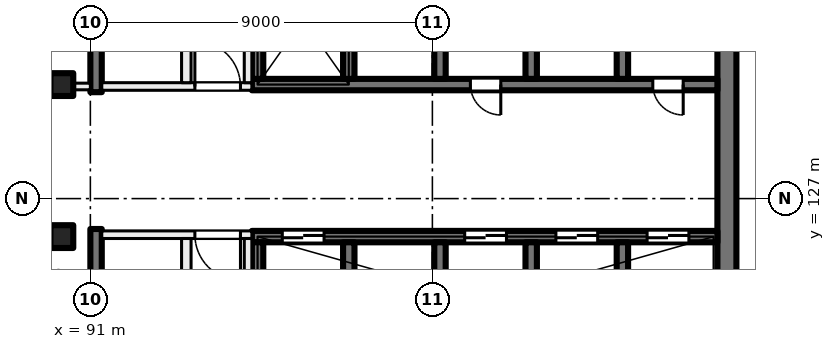
"""IFC4 building model, lengths in metres.
Left out: names, types, materials, properties, quantities, classifications, styles, units other than length and angle.
Written with IfcOpenShell. Run it as: python <this file> out.ifc"""

import sys

from ifc_helpers import new_model, si_unit, direction, frame, frame_2d, origin, origin_2d, place, context, subcontext, project, spatial, rectangle, extrude, element, fill, save


model = new_model("IFC4")
c1 = context("Model", 3, precision=1e-05, world=origin(), true_north=direction((0.0, 1.0)))
c2 = subcontext(c1, "Body", "Model", "MODEL_VIEW")
j1 = project(units=[si_unit("LENGTHUNIT", "METRE"), si_unit("PLANEANGLEUNIT", "RADIAN")], contexts=[c1])
p1 = place(None, origin())
s1 = spatial("IfcSite", under=j1, at=p1, CompositionType="ELEMENT")
p2 = place(p1, origin())
s2 = spatial("IfcBuilding", under=s1, at=p2, CompositionType="ELEMENT")
p3 = place(p2, frame((0.0, 0.0, 228.0)))
s3 = spatial("IfcBuildingStorey", under=s2, at=p3, CompositionType="ELEMENT", Elevation=228.0)
for number, where, z_axis, x_axis in (
    (1, (90.25, 130.0, 0.0), (0.0, 0.0, 1.0), (1.0, 0.0, 0.0)),
    (2, (90.25, 126.0, 0.0), (0.0, 0.0, 1.0), (1.0, 0.0, 0.0)),
):
    element("IfcColumn", number, at=place(p3, frame(where, z_axis=z_axis, x_axis=x_axis)), inside=s3, PredefinedType="COLUMN", context=c2, shape_type="SweptSolid", body=[
        extrude(rectangle(XDim=0.6, YDim=0.6, at=origin_2d()), origin(), (0.0, 0.0, 1.0), 4.0),
    ])
p4 = place(p3, frame((107.75, 135.2, 0.0), z_axis=(0.0, 0.0, 1.0), x_axis=(0.0, -1.0, 0.0)))
e3 = element("IfcWall", 3, at=p4, inside=s3, PredefinedType="SHEAR", context=c2, shape_type="SweptSolid", body=[
    extrude(rectangle(XDim=14.4, YDim=0.5, at=frame_2d((7.2, 0.0))), origin(), (0.0, 0.0, 1.0), 4.0),
])
p5 = place(p3, frame((107.5, 130.0, 0.0), z_axis=(0.0, 0.0, 1.0), x_axis=(-1.0, 0.0, 0.0)))
e4 = element("IfcWall", 4, at=p5, inside=s3, PredefinedType="SHEAR", context=c2, shape_type="SweptSolid", body=[
    extrude(rectangle(XDim=12.25, YDim=0.3, at=frame_2d((6.125, 0.0))), origin(), (0.0, 0.0, 1.0), 4.0),
])
p6 = place(p5, frame((0.9, 0.0, 0.0)))
e5 = element("IfcOpeningElement", 5, at=p6, cuts=e4, PredefinedType="OPENING", context=c2, shape_type="SweptSolid", body=[
    extrude(rectangle(XDim=0.8, YDim=2.1, at=frame_2d((0.4, 1.05))), frame((0.0, 0.16, 0.0), z_axis=(0.0, -1.0, 0.0), x_axis=(1.0, 0.0, 0.0)), (0.0, 0.0, 1.0), 0.32),
])
p7 = place(p5, frame((5.7, 0.0, 0.0)))
e6 = element("IfcOpeningElement", 6, at=p7, cuts=e4, PredefinedType="OPENING", context=c2, shape_type="SweptSolid", body=[
    extrude(rectangle(XDim=0.8, YDim=2.1, at=frame_2d((0.4, 1.05))), frame((0.0, 0.16, 0.0), z_axis=(0.0, -1.0, 0.0), x_axis=(1.0, 0.0, 0.0)), (0.0, 0.0, 1.0), 0.32),
])
for number, where, z_axis, x_axis in (
    (7, (105.0, 133.25, 0.0), (0.0, 0.0, 1.0), (0.0, -1.0, 0.0)),
    (8, (102.6, 133.25, 0.0), (0.0, 0.0, 1.0), (0.0, -1.0, 0.0)),
    (9, (100.2, 133.25, 0.0), (0.0, 0.0, 1.0), (0.0, -1.0, 0.0)),
    (10, (97.8, 133.25, 0.0), (0.0, 0.0, 1.0), (0.0, -1.0, 0.0)),
    (11, (95.4, 133.25, 0.0), (0.0, 0.0, 1.0), (0.0, -1.0, 0.0)),
):
    element("IfcWall", number, at=place(p3, frame(where, z_axis=z_axis, x_axis=x_axis)), inside=s3, PredefinedType="SHEAR", context=c2, shape_type="SweptSolid", body=[
        extrude(rectangle(XDim=3.1, YDim=0.3, at=frame_2d((1.55, 0.0))), origin(), (0.0, 0.0, 1.0), 4.0),
    ])
p8 = place(p3, frame((107.5, 126.0, 0.0), z_axis=(0.0, 0.0, 1.0), x_axis=(-1.0, 0.0, 0.0)))
e12 = element("IfcWall", 12, at=p8, inside=s3, PredefinedType="SHEAR", context=c2, shape_type="SweptSolid", body=[
    extrude(rectangle(XDim=12.25, YDim=0.3, at=frame_2d((6.125, 0.0))), origin(), (0.0, 0.0, 1.0), 4.0),
])
p9 = place(p8, frame((0.75, 0.0, 0.0)))
e13 = element("IfcOpeningElement", 13, at=p9, cuts=e12, PredefinedType="OPENING", context=c2, shape_type="SweptSolid", body=[
    extrude(rectangle(XDim=1.1, YDim=2.1, at=frame_2d((0.55, 1.05))), frame((0.0, 0.16, 0.0), z_axis=(0.0, -1.0, 0.0), x_axis=(1.0, 0.0, 0.0)), (0.0, 0.0, 1.0), 0.32),
])
p10 = place(p8, frame((3.15, 0.0, 0.0)))
e14 = element("IfcOpeningElement", 14, at=p10, cuts=e12, PredefinedType="OPENING", context=c2, shape_type="SweptSolid", body=[
    extrude(rectangle(XDim=1.1, YDim=2.1, at=frame_2d((0.55, 1.05))), frame((0.0, 0.16, 0.0), z_axis=(0.0, -1.0, 0.0), x_axis=(1.0, 0.0, 0.0)), (0.0, 0.0, 1.0), 0.32),
])
p11 = place(p8, frame((5.55, 0.0, 0.0)))
e15 = element("IfcOpeningElement", 15, at=p11, cuts=e12, PredefinedType="OPENING", context=c2, shape_type="SweptSolid", body=[
    extrude(rectangle(XDim=1.1, YDim=2.1, at=frame_2d((0.55, 1.05))), frame((0.0, 0.16, 0.0), z_axis=(0.0, -1.0, 0.0), x_axis=(1.0, 0.0, 0.0)), (0.0, 0.0, 1.0), 0.32),
])
p12 = place(p8, frame((10.35, 0.0, 0.0)))
e16 = element("IfcOpeningElement", 16, at=p12, cuts=e12, PredefinedType="OPENING", context=c2, shape_type="SweptSolid", body=[
    extrude(rectangle(XDim=1.1, YDim=2.1, at=frame_2d((0.55, 1.05))), frame((0.0, 0.16, 0.0), z_axis=(0.0, -1.0, 0.0), x_axis=(1.0, 0.0, 0.0)), (0.0, 0.0, 1.0), 0.32),
])
for number, where, z_axis, x_axis in (
    (17, (105.0, 125.85, 0.0), (0.0, 0.0, 1.0), (0.0, -1.0, 0.0)),
    (18, (102.6, 125.85, 0.0), (0.0, 0.0, 1.0), (0.0, -1.0, 0.0)),
    (19, (100.2, 125.85, 0.0), (0.0, 0.0, 1.0), (0.0, -1.0, 0.0)),
    (20, (97.8, 125.85, 0.0), (0.0, 0.0, 1.0), (0.0, -1.0, 0.0)),
    (21, (95.4, 125.85, 0.0), (0.0, 0.0, 1.0), (0.0, -1.0, 0.0)),
):
    element("IfcWall", number, at=place(p3, frame(where, z_axis=z_axis, x_axis=x_axis)), inside=s3, PredefinedType="SHEAR", context=c2, shape_type="SweptSolid", body=[
        extrude(rectangle(XDim=3.1, YDim=0.3, at=frame_2d((1.55, 0.0))), origin(), (0.0, 0.0, 1.0), 4.0),
    ])
for number, where, z_axis, x_axis in (
    (22, (91.15, 138.5, 0.0), (0.0, 0.0, 1.0), (0.0, -1.0, 0.0)),
    (23, (91.15, 126.2, 0.0), (0.0, 0.0, 1.0), (0.0, -1.0, 0.0)),
):
    element("IfcWall", number, at=place(p3, frame(where, z_axis=z_axis, x_axis=x_axis)), inside=s3, PredefinedType="SHEAR", context=c2, shape_type="SweptSolid", body=[
        extrude(rectangle(XDim=8.7, YDim=0.3, at=frame_2d((4.35, 0.0))), origin(), (0.0, 0.0, 1.0), 4.0),
    ])
p13 = place(p3, frame((95.25, 126.05, 0.0), z_axis=(0.0, 0.0, 1.0), x_axis=(-1.0, 0.0, 0.0)))
e24 = element("IfcWall", 24, at=p13, inside=s3, PredefinedType="PARTITIONING", context=c2, shape_type="SweptSolid", body=[
    extrude(rectangle(XDim=3.95, YDim=0.2, at=frame_2d((1.975, 0.0))), origin(), (0.0, 0.0, 1.0), 3.625),
])
p14 = place(p13, frame((0.3, 0.0, 0.0)))
e25 = element("IfcOpeningElement", 25, at=p14, cuts=e24, PredefinedType="OPENING", context=c2, shape_type="SweptSolid", body=[
    extrude(rectangle(XDim=1.2, YDim=2.1, at=frame_2d((0.6, 1.05))), frame((0.0, 0.11, 0.0), z_axis=(0.0, -1.0, 0.0), x_axis=(1.0, 0.0, 0.0)), (0.0, 0.0, 1.0), 0.22),
])
p15 = place(p3, frame((95.15, 117.5, 0.0), z_axis=(0.0, 0.0, 1.0), x_axis=(0.0, 1.0, 0.0)))
e26 = element("IfcWall", 26, at=p15, inside=s3, PredefinedType="PARTITIONING", context=c2, shape_type="SweptSolid", body=[
    extrude(rectangle(XDim=8.45, YDim=0.2, at=frame_2d((4.225, 0.0))), origin(), (0.0, 0.0, 1.0), 3.625),
])
p16 = place(p15, frame((1.725, 0.0, 0.0)))
e27 = element("IfcOpeningElement", 27, at=p16, cuts=e26, PredefinedType="OPENING", context=c2, shape_type="SweptSolid", body=[
    extrude(rectangle(XDim=1.5, YDim=2.1, at=frame_2d((0.75, 1.05))), frame((0.0, 0.11, 0.0), z_axis=(0.0, -1.0, 0.0), x_axis=(1.0, 0.0, 0.0)), (0.0, 0.0, 1.0), 0.22),
])
p17 = place(p3, frame((93.525, 117.5, 0.0), z_axis=(0.0, 0.0, 1.0), x_axis=(0.0, 1.0, 0.0)))
e28 = element("IfcWall", 28, at=p17, inside=s3, PredefinedType="PARTITIONING", context=c2, shape_type="SweptSolid", body=[
    extrude(rectangle(XDim=8.45, YDim=0.25, at=frame_2d((4.225, 0.0))), origin(), (0.0, 0.0, 1.0), 3.625),
])
p18 = place(p17, frame((5.26, 0.0, 0.0)))
e29 = element("IfcOpeningElement", 29, at=p18, cuts=e28, PredefinedType="OPENING", context=c2, shape_type="SweptSolid", body=[
    extrude(rectangle(XDim=0.8, YDim=2.1, at=frame_2d((0.4, 1.05))), frame((0.0, 0.135, 0.0), z_axis=(0.0, -1.0, 0.0), x_axis=(1.0, 0.0, 0.0)), (0.0, 0.0, 1.0), 0.27),
])
p19 = place(p17, frame((0.985, 0.0, 0.0)))
e30 = element("IfcOpeningElement", 30, at=p19, cuts=e28, PredefinedType="OPENING", context=c2, shape_type="SweptSolid", body=[
    extrude(rectangle(XDim=0.8, YDim=2.1, at=frame_2d((0.4, 1.05))), frame((0.0, 0.135, 0.0), z_axis=(0.0, -1.0, 0.0), x_axis=(1.0, 0.0, 0.0)), (0.0, 0.0, 1.0), 0.27),
])
p20 = place(p3, frame((91.3, 129.95, 0.0), z_axis=(0.0, 0.0, 1.0), x_axis=(1.0, 0.0, 0.0)))
e31 = element("IfcWall", 31, at=p20, inside=s3, PredefinedType="PARTITIONING", context=c2, shape_type="SweptSolid", body=[
    extrude(rectangle(XDim=3.95, YDim=0.2, at=frame_2d((1.975, 0.0))), origin(), (0.0, 0.0, 1.0), 3.625),
])
p21 = place(p20, frame((2.45, 0.0, 0.0)))
e32 = element("IfcOpeningElement", 32, at=p21, cuts=e31, PredefinedType="OPENING", context=c2, shape_type="SweptSolid", body=[
    extrude(rectangle(XDim=1.2, YDim=2.1, at=frame_2d((0.6, 1.05))), frame((0.0, 0.11, 0.0), z_axis=(0.0, -1.0, 0.0), x_axis=(1.0, 0.0, 0.0)), (0.0, 0.0, 1.0), 0.22),
])
p22 = place(p3, frame((95.15, 130.05, 0.0), z_axis=(0.0, 0.0, 1.0), x_axis=(0.0, 1.0, 0.0)))
e33 = element("IfcWall", 33, at=p22, inside=s3, PredefinedType="PARTITIONING", context=c2, shape_type="SweptSolid", body=[
    extrude(rectangle(XDim=8.45, YDim=0.2, at=frame_2d((4.225, 0.0))), origin(), (0.0, 0.0, 1.0), 3.625),
])
p23 = place(p22, frame((5.225, 0.0, 0.0)))
e34 = element("IfcOpeningElement", 34, at=p23, cuts=e33, PredefinedType="OPENING", context=c2, shape_type="SweptSolid", body=[
    extrude(rectangle(XDim=1.5, YDim=2.1, at=frame_2d((0.75, 1.05))), frame((0.0, 0.11, 0.0), z_axis=(0.0, -1.0, 0.0), x_axis=(1.0, 0.0, 0.0)), (0.0, 0.0, 1.0), 0.22),
])
p24 = place(p3, frame((93.525, 130.05, 0.0), z_axis=(0.0, 0.0, 1.0), x_axis=(0.0, 1.0, 0.0)))
e35 = element("IfcWall", 35, at=p24, inside=s3, PredefinedType="PARTITIONING", context=c2, shape_type="SweptSolid", body=[
    extrude(rectangle(XDim=8.45, YDim=0.25, at=frame_2d((4.225, 0.0))), origin(), (0.0, 0.0, 1.0), 3.625),
])
p25 = place(p24, frame((1.69, 0.0, 0.0)))
e36 = element("IfcOpeningElement", 36, at=p25, cuts=e35, PredefinedType="OPENING", context=c2, shape_type="SweptSolid", body=[
    extrude(rectangle(XDim=0.8, YDim=2.1, at=frame_2d((0.4, 1.05))), frame((0.0, 0.135, 0.0), z_axis=(0.0, -1.0, 0.0), x_axis=(1.0, 0.0, 0.0)), (0.0, 0.0, 1.0), 0.27),
])
p26 = place(p24, frame((5.965, 0.0, 0.0)))
e37 = element("IfcOpeningElement", 37, at=p26, cuts=e35, PredefinedType="OPENING", context=c2, shape_type="SweptSolid", body=[
    extrude(rectangle(XDim=0.8, YDim=2.1, at=frame_2d((0.4, 1.05))), frame((0.0, 0.135, 0.0), z_axis=(0.0, -1.0, 0.0), x_axis=(1.0, 0.0, 0.0)), (0.0, 0.0, 1.0), 0.27),
])
p27 = place(p3, frame((85.838, 129.95, 0.0), z_axis=(0.0, 0.0, 1.0), x_axis=(1.0, 0.0, 0.0)))
e38 = element("IfcWall", 38, at=p27, inside=s3, PredefinedType="PARTITIONING", context=c2, shape_type="SweptSolid", body=[
    extrude(rectangle(XDim=5.162, YDim=0.175, at=frame_2d((2.581, 0.0))), origin(), (0.0, 0.0, 1.0), 3.625),
])
p28 = place(p27, frame((1.971, 0.0, 0.0)))
e39 = element("IfcOpeningElement", 39, at=p28, cuts=e38, PredefinedType="OPENING", context=c2, shape_type="SweptSolid", body=[
    extrude(rectangle(XDim=1.2, YDim=2.1, at=frame_2d((0.6, 1.05))), frame((0.0, 0.097, 0.0), z_axis=(0.0, -1.0, 0.0), x_axis=(1.0, 0.0, 0.0)), (0.0, 0.0, 1.0), 0.195),
])
p29 = place(p9, origin())
e40 = element("IfcDoor", 40, at=p29, inside=s3, OperationType="DOUBLE_DOOR_SLIDING", PredefinedType="DOOR", context=c2, shape_type="SweptSolid", body=[
    extrude(rectangle(XDim=1.1, YDim=2.1, at=frame_2d((0.55, 1.05))), frame((0.0, 0.025, 0.0), z_axis=(0.0, -1.0, 0.0), x_axis=(1.0, 0.0, 0.0)), (0.0, 0.0, 1.0), 0.05),
])
fill(e13, e40)
p30 = place(p10, origin())
e41 = element("IfcDoor", 41, at=p30, inside=s3, OperationType="DOUBLE_DOOR_SLIDING", PredefinedType="DOOR", context=c2, shape_type="SweptSolid", body=[
    extrude(rectangle(XDim=1.1, YDim=2.1, at=frame_2d((0.55, 1.05))), frame((0.0, 0.025, 0.0), z_axis=(0.0, -1.0, 0.0), x_axis=(1.0, 0.0, 0.0)), (0.0, 0.0, 1.0), 0.05),
])
fill(e14, e41)
p31 = place(p11, origin())
e42 = element("IfcDoor", 42, at=p31, inside=s3, OperationType="DOUBLE_DOOR_SLIDING", PredefinedType="DOOR", context=c2, shape_type="SweptSolid", body=[
    extrude(rectangle(XDim=1.1, YDim=2.1, at=frame_2d((0.55, 1.05))), frame((0.0, 0.025, 0.0), z_axis=(0.0, -1.0, 0.0), x_axis=(1.0, 0.0, 0.0)), (0.0, 0.0, 1.0), 0.05),
])
fill(e15, e42)
p32 = place(p12, origin())
e43 = element("IfcDoor", 43, at=p32, inside=s3, OperationType="DOUBLE_DOOR_SLIDING", PredefinedType="DOOR", context=c2, shape_type="SweptSolid", body=[
    extrude(rectangle(XDim=1.1, YDim=2.1, at=frame_2d((0.55, 1.05))), frame((0.0, 0.025, 0.0), z_axis=(0.0, -1.0, 0.0), x_axis=(1.0, 0.0, 0.0)), (0.0, 0.0, 1.0), 0.05),
])
fill(e16, e43)
p33 = place(p6, origin())
e44 = element("IfcDoor", 44, at=p33, inside=s3, OperationType="SINGLE_SWING_LEFT", PredefinedType="DOOR", context=c2, shape_type="SweptSolid", body=[
    extrude(rectangle(XDim=0.8, YDim=2.1, at=frame_2d((0.4, 1.05))), frame((0.0, 0.025, 0.0), z_axis=(0.0, -1.0, 0.0), x_axis=(1.0, 0.0, 0.0)), (0.0, 0.0, 1.0), 0.05),
])
fill(e5, e44)
p34 = place(p7, origin())
e45 = element("IfcDoor", 45, at=p34, inside=s3, OperationType="SINGLE_SWING_RIGHT", PredefinedType="DOOR", context=c2, shape_type="SweptSolid", body=[
    extrude(rectangle(XDim=0.8, YDim=2.1, at=frame_2d((0.4, 1.05))), frame((0.0, 0.025, 0.0), z_axis=(0.0, -1.0, 0.0), x_axis=(1.0, 0.0, 0.0)), (0.0, 0.0, 1.0), 0.05),
])
fill(e6, e45)
p35 = place(p14, origin())
e46 = element("IfcDoor", 46, at=p35, inside=s3, OperationType="DOUBLE_DOOR_SINGLE_SWING", PredefinedType="DOOR", context=c2, shape_type="SweptSolid", body=[
    extrude(rectangle(XDim=1.2, YDim=2.1, at=frame_2d((0.6, 1.05))), frame((0.0, 0.025, 0.0), z_axis=(0.0, -1.0, 0.0), x_axis=(1.0, 0.0, 0.0)), (0.0, 0.0, 1.0), 0.05),
])
fill(e25, e46)
p36 = place(p21, origin())
e47 = element("IfcDoor", 47, at=p36, inside=s3, OperationType="DOUBLE_DOOR_SINGLE_SWING", PredefinedType="DOOR", context=c2, shape_type="SweptSolid", body=[
    extrude(rectangle(XDim=1.2, YDim=2.1, at=frame_2d((0.6, 1.05))), frame((0.0, 0.025, 0.0), z_axis=(0.0, -1.0, 0.0), x_axis=(1.0, 0.0, 0.0)), (0.0, 0.0, 1.0), 0.05),
])
fill(e32, e47)
save(model, sys.argv[1])
